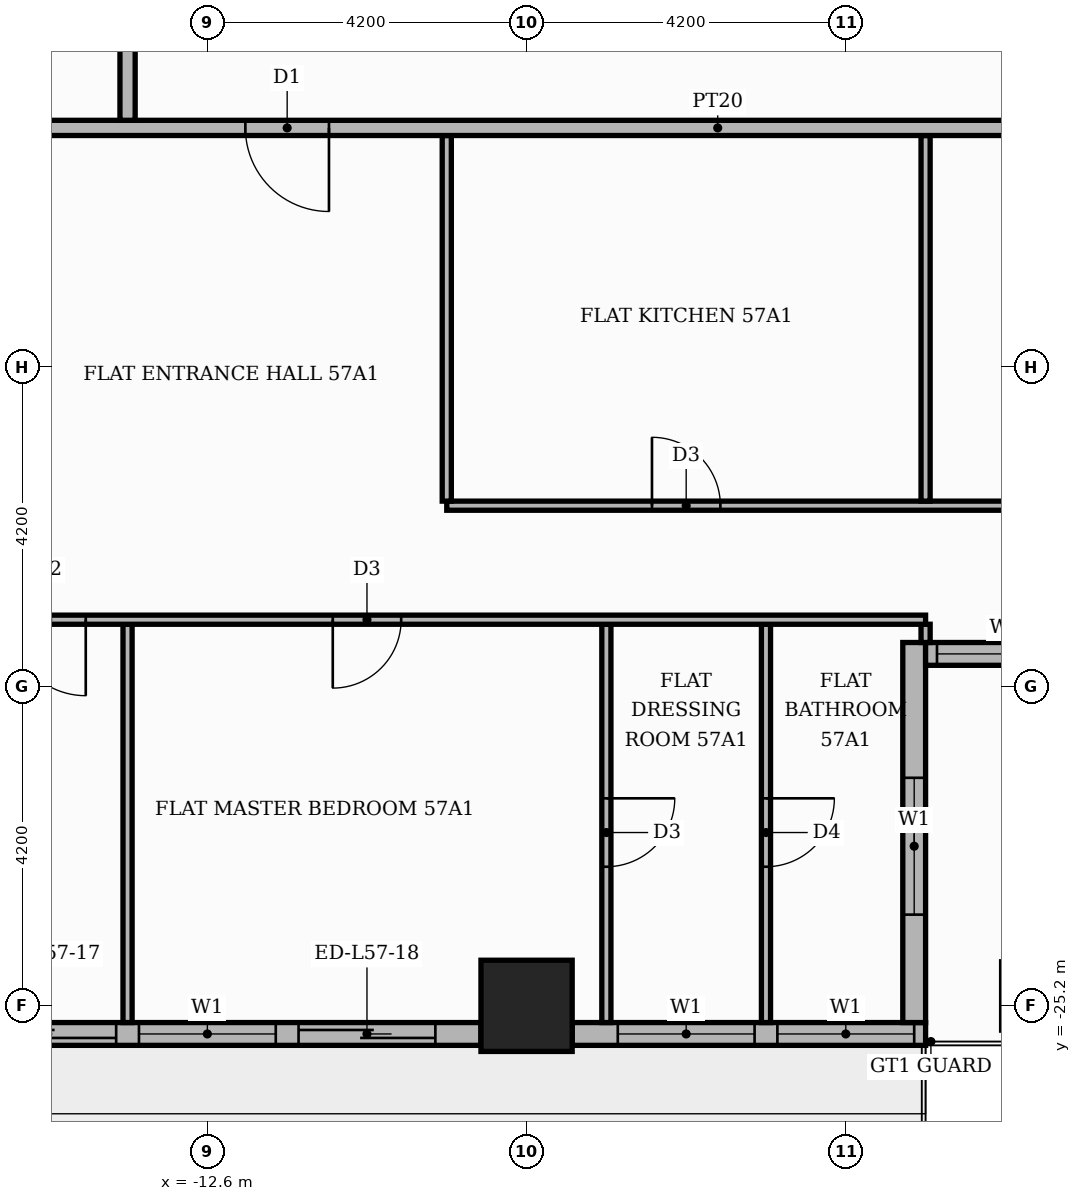
"""IFC4 building model, lengths in metres.
Left out: names, types, materials, properties, quantities, classifications, styles, units other than length and angle.
Written with IfcOpenShell. Run it as: python <this file> out.ifc"""

import sys

from ifc_helpers import new_model, si_unit, direction, frame, frame_2d, origin, origin_2d, place, context, subcontext, project, spatial, rectangle, extrude, element, fill, save


model = new_model("IFC4")
c1 = context("Model", 3, precision=1e-05, world=origin(), true_north=direction((0.0, 1.0)))
c2 = subcontext(c1, "Body", "Model", "MODEL_VIEW")
j1 = project(units=[si_unit("LENGTHUNIT", "METRE"), si_unit("PLANEANGLEUNIT", "RADIAN")], contexts=[c1])
p1 = place(None, origin())
s1 = spatial("IfcSite", under=j1, at=p1, CompositionType="ELEMENT")
p2 = place(p1, origin())
s2 = spatial("IfcBuilding", under=s1, at=p2, CompositionType="ELEMENT")
p3 = place(p2, frame((0.0, 0.0, 240.6)))
s3 = spatial("IfcBuildingStorey", under=s2, at=p3, CompositionType="ELEMENT", Elevation=240.6)
p4 = place(p3, frame((-8.4, -25.2, 0.0), z_axis=(0.0, 0.0, 1.0), x_axis=(1.0, 0.0, 0.0)))
e1 = element("IfcColumn", 1, at=p4, inside=s3, PredefinedType="COLUMN", context=c2, shape_type="SweptSolid", body=[
    extrude(rectangle(XDim=1.2, YDim=1.2, at=origin_2d()), origin(), (0.0, 0.0, 1.0), 3.9),
])
p5 = place(p3, frame((-16.2, -25.57, 0.0), z_axis=(0.0, 0.0, 1.0), x_axis=(1.0, 0.0, 0.0)))
e2 = element("IfcWall", 2, at=p5, inside=s3, PredefinedType="STANDARD", context=c2, shape_type="SweptSolid", body=[
    extrude(rectangle(XDim=7.2, YDim=0.3, at=frame_2d((3.6, 0.0))), origin(), (0.0, 0.0, 1.0), 3.48),
])
p6 = place(p5, frame((0.6, 0.0, 0.0)))
e3 = element("IfcOpeningElement", 3, at=p6, cuts=e2, PredefinedType="OPENING", context=c2, shape_type="SweptSolid", body=[
    extrude(rectangle(XDim=1.8, YDim=2.4, at=frame_2d((0.9, 1.2))), frame((0.0, 0.16, 0.0), z_axis=(0.0, -1.0, 0.0), x_axis=(1.0, 0.0, 0.0)), (0.0, 0.0, 1.0), 0.32),
])
p7 = place(p5, frame((2.7, 0.0, 0.9)))
e4 = element("IfcOpeningElement", 4, at=p7, cuts=e2, PredefinedType="OPENING", context=c2, shape_type="SweptSolid", body=[
    extrude(rectangle(XDim=1.8, YDim=2.1, at=frame_2d((0.9, 1.05))), frame((0.0, 0.16, 0.0), z_axis=(0.0, -1.0, 0.0), x_axis=(1.0, 0.0, 0.0)), (0.0, 0.0, 1.0), 0.32),
])
p8 = place(p5, frame((4.8, 0.0, 0.0)))
e5 = element("IfcOpeningElement", 5, at=p8, cuts=e2, PredefinedType="OPENING", context=c2, shape_type="SweptSolid", body=[
    extrude(rectangle(XDim=1.8, YDim=2.4, at=frame_2d((0.9, 1.2))), frame((0.0, 0.16, 0.0), z_axis=(0.0, -1.0, 0.0), x_axis=(1.0, 0.0, 0.0)), (0.0, 0.0, 1.0), 0.32),
])
p9 = place(p3, frame((-7.8, -25.57, 0.0), z_axis=(0.0, 0.0, 1.0), x_axis=(1.0, 0.0, 0.0)))
e6 = element("IfcWall", 6, at=p9, inside=s3, PredefinedType="STANDARD", context=c2, shape_type="SweptSolid", body=[
    extrude(rectangle(XDim=4.65, YDim=0.3, at=frame_2d((2.325, 0.0))), origin(), (0.0, 0.0, 1.0), 3.48),
])
p10 = place(p9, frame((0.6, 0.0, 0.9)))
e7 = element("IfcOpeningElement", 7, at=p10, cuts=e6, PredefinedType="OPENING", context=c2, shape_type="SweptSolid", body=[
    extrude(rectangle(XDim=1.8, YDim=2.1, at=frame_2d((0.9, 1.05))), frame((0.0, 0.16, 0.0), z_axis=(0.0, -1.0, 0.0), x_axis=(1.0, 0.0, 0.0)), (0.0, 0.0, 1.0), 0.32),
])
p11 = place(p9, frame((2.7, 0.0, 0.9)))
e8 = element("IfcOpeningElement", 8, at=p11, cuts=e6, PredefinedType="OPENING", context=c2, shape_type="SweptSolid", body=[
    extrude(rectangle(XDim=1.8, YDim=2.1, at=frame_2d((0.9, 1.05))), frame((0.0, 0.16, 0.0), z_axis=(0.0, -1.0, 0.0), x_axis=(1.0, 0.0, 0.0)), (0.0, 0.0, 1.0), 0.32),
])
p12 = place(p3, frame((-3.3, -25.42, 0.0), z_axis=(0.0, 0.0, 1.0), x_axis=(0.0, 1.0, 0.0)))
e9 = element("IfcWall", 9, at=p12, inside=s3, PredefinedType="STANDARD", context=c2, shape_type="SweptSolid", body=[
    extrude(rectangle(XDim=5.0, YDim=0.3, at=frame_2d((2.5, 0.0))), origin(), (0.0, 0.0, 1.0), 3.48),
])
p13 = place(p12, frame((1.42, 0.0, 0.9)))
e10 = element("IfcOpeningElement", 10, at=p13, cuts=e9, PredefinedType="OPENING", context=c2, shape_type="SweptSolid", body=[
    extrude(rectangle(XDim=1.8, YDim=2.1, at=frame_2d((0.9, 1.05))), frame((0.0, 0.16, 0.0), z_axis=(0.0, -1.0, 0.0), x_axis=(1.0, 0.0, 0.0)), (0.0, 0.0, 1.0), 0.32),
])
p14 = place(p3, frame((-3.15, -20.57, 0.0), z_axis=(0.0, 0.0, 1.0), x_axis=(1.0, 0.0, 0.0)))
e11 = element("IfcWall", 11, at=p14, inside=s3, PredefinedType="STANDARD", context=c2, shape_type="SweptSolid", body=[
    extrude(rectangle(XDim=6.6, YDim=0.3, at=frame_2d((3.3, 0.0))), origin(), (0.0, 0.0, 1.0), 3.48),
])
p15 = place(p14, frame((0.15, 0.0, 0.9)))
e12 = element("IfcOpeningElement", 12, at=p15, cuts=e11, PredefinedType="OPENING", context=c2, shape_type="SweptSolid", body=[
    extrude(rectangle(XDim=1.8, YDim=2.1, at=frame_2d((0.9, 1.05))), frame((0.0, 0.16, 0.0), z_axis=(0.0, -1.0, 0.0), x_axis=(1.0, 0.0, 0.0)), (0.0, 0.0, 1.0), 0.32),
])
p16 = place(p14, frame((2.25, 0.0, 0.0)))
e13 = element("IfcOpeningElement", 13, at=p16, cuts=e11, PredefinedType="OPENING", context=c2, shape_type="SweptSolid", body=[
    extrude(rectangle(XDim=1.8, YDim=2.4, at=frame_2d((0.9, 1.2))), frame((0.0, 0.16, 0.0), z_axis=(0.0, -1.0, 0.0), x_axis=(1.0, 0.0, 0.0)), (0.0, 0.0, 1.0), 0.32),
])
p17 = place(p14, frame((4.35, 0.0, 0.9)))
e14 = element("IfcOpeningElement", 14, at=p17, cuts=e11, PredefinedType="OPENING", context=c2, shape_type="SweptSolid", body=[
    extrude(rectangle(XDim=1.8, YDim=2.1, at=frame_2d((0.9, 1.05))), frame((0.0, 0.16, 0.0), z_axis=(0.0, -1.0, 0.0), x_axis=(1.0, 0.0, 0.0)), (0.0, 0.0, 1.0), 0.32),
])
p18 = place(p3, frame((-13.65, -25.42, 0.0), z_axis=(0.0, 0.0, 1.0), x_axis=(0.0, 1.0, 0.0)))
e15 = element("IfcWall", 15, at=p18, inside=s3, PredefinedType="PARTITIONING", context=c2, shape_type="SweptSolid", body=[
    extrude(rectangle(XDim=5.24, YDim=0.12, at=frame_2d((2.62, 0.0))), origin(), (0.0, 0.0, 1.0), 3.48),
])
p19 = place(p3, frame((-7.35, -25.42, 0.0), z_axis=(0.0, 0.0, 1.0), x_axis=(0.0, 1.0, 0.0)))
e16 = element("IfcWall", 16, at=p19, inside=s3, PredefinedType="PARTITIONING", context=c2, shape_type="SweptSolid", body=[
    extrude(rectangle(XDim=5.24, YDim=0.12, at=frame_2d((2.62, 0.0))), origin(), (0.0, 0.0, 1.0), 3.48),
])
p20 = place(p19, frame((2.05, 0.0, 0.0)))
e17 = element("IfcOpeningElement", 17, at=p20, cuts=e16, PredefinedType="OPENING", context=c2, shape_type="SweptSolid", body=[
    extrude(rectangle(XDim=0.9, YDim=2.1, at=frame_2d((0.45, 1.05))), frame((0.0, 0.07, 0.0), z_axis=(0.0, -1.0, 0.0), x_axis=(1.0, 0.0, 0.0)), (0.0, 0.0, 1.0), 0.14),
])
p21 = place(p3, frame((-5.25, -25.42, 0.0), z_axis=(0.0, 0.0, 1.0), x_axis=(0.0, 1.0, 0.0)))
e18 = element("IfcWall", 18, at=p21, inside=s3, PredefinedType="PARTITIONING", context=c2, shape_type="SweptSolid", body=[
    extrude(rectangle(XDim=5.24, YDim=0.12, at=frame_2d((2.62, 0.0))), origin(), (0.0, 0.0, 1.0), 3.48),
])
p22 = place(p21, frame((2.05, 0.0, 0.0)))
e19 = element("IfcOpeningElement", 19, at=p22, cuts=e18, PredefinedType="OPENING", context=c2, shape_type="SweptSolid", body=[
    extrude(rectangle(XDim=0.9, YDim=2.1, at=frame_2d((0.45, 1.05))), frame((0.0, 0.07, 0.0), z_axis=(0.0, -1.0, 0.0), x_axis=(1.0, 0.0, 0.0)), (0.0, 0.0, 1.0), 0.14),
])
p23 = place(p3, frame((-3.15, -20.42, 0.0), z_axis=(0.0, 0.0, 1.0), x_axis=(0.0, 1.0, 0.0)))
e20 = element("IfcWall", 20, at=p23, inside=s3, PredefinedType="PARTITIONING", context=c2, shape_type="SweptSolid", body=[
    extrude(rectangle(XDim=0.24, YDim=0.12, at=frame_2d((0.12, 0.0))), origin(), (0.0, 0.0, 1.0), 3.48),
])
p24 = place(p3, frame((-20.719, -20.12, 0.0), z_axis=(0.0, 0.0, 1.0), x_axis=(1.0, 0.0, 0.0)))
e21 = element("IfcWall", 21, at=p24, inside=s3, PredefinedType="PARTITIONING", context=c2, shape_type="SweptSolid", body=[
    extrude(rectangle(XDim=17.569, YDim=0.12, at=frame_2d((8.785, 0.0))), origin(), (0.0, 0.0, 1.0), 3.48),
])
p25 = place(p24, frame((5.519, 0.0, 0.0)))
e22 = element("IfcOpeningElement", 22, at=p25, cuts=e21, PredefinedType="OPENING", context=c2, shape_type="SweptSolid", body=[
    extrude(rectangle(XDim=1.0, YDim=2.1, at=frame_2d((0.5, 1.05))), frame((0.0, 0.07, 0.0), z_axis=(0.0, -1.0, 0.0), x_axis=(1.0, 0.0, 0.0)), (0.0, 0.0, 1.0), 0.14),
])
p26 = place(p24, frame((9.769, 0.0, 0.0)))
e23 = element("IfcOpeningElement", 23, at=p26, cuts=e21, PredefinedType="OPENING", context=c2, shape_type="SweptSolid", body=[
    extrude(rectangle(XDim=0.9, YDim=2.1, at=frame_2d((0.45, 1.05))), frame((0.0, 0.07, 0.0), z_axis=(0.0, -1.0, 0.0), x_axis=(1.0, 0.0, 0.0)), (0.0, 0.0, 1.0), 0.14),
])
p27 = place(p3, frame((-9.45, -18.62, 0.0), z_axis=(0.0, 0.0, 1.0), x_axis=(1.0, 0.0, 0.0)))
e24 = element("IfcWall", 24, at=p27, inside=s3, PredefinedType="PARTITIONING", context=c2, shape_type="SweptSolid", body=[
    extrude(rectangle(XDim=23.0, YDim=0.12, at=frame_2d((11.5, 0.0))), origin(), (0.0, 0.0, 1.0), 3.48),
])
p28 = place(p27, frame((2.7, 0.0, 0.0)))
e25 = element("IfcOpeningElement", 25, at=p28, cuts=e24, PredefinedType="OPENING", context=c2, shape_type="SweptSolid", body=[
    extrude(rectangle(XDim=0.9, YDim=2.1, at=frame_2d((0.45, 1.05))), frame((0.0, 0.07, 0.0), z_axis=(0.0, -1.0, 0.0), x_axis=(1.0, 0.0, 0.0)), (0.0, 0.0, 1.0), 0.14),
])
p29 = place(p27, frame((9.0, 0.0, 0.0)))
e26 = element("IfcOpeningElement", 26, at=p29, cuts=e24, PredefinedType="OPENING", context=c2, shape_type="SweptSolid", body=[
    extrude(rectangle(XDim=0.9, YDim=2.1, at=frame_2d((0.45, 1.05))), frame((0.0, 0.07, 0.0), z_axis=(0.0, -1.0, 0.0), x_axis=(1.0, 0.0, 0.0)), (0.0, 0.0, 1.0), 0.14),
])
p30 = place(p27, frame((13.2, 0.0, 0.0)))
e27 = element("IfcOpeningElement", 27, at=p30, cuts=e24, PredefinedType="OPENING", context=c2, shape_type="SweptSolid", body=[
    extrude(rectangle(XDim=0.9, YDim=2.1, at=frame_2d((0.45, 1.05))), frame((0.0, 0.07, 0.0), z_axis=(0.0, -1.0, 0.0), x_axis=(1.0, 0.0, 0.0)), (0.0, 0.0, 1.0), 0.14),
])
p31 = place(p27, frame((16.35, 0.0, 0.0)))
e28 = element("IfcOpeningElement", 28, at=p31, cuts=e24, PredefinedType="OPENING", context=c2, shape_type="SweptSolid", body=[
    extrude(rectangle(XDim=0.9, YDim=2.1, at=frame_2d((0.45, 1.05))), frame((0.0, 0.07, 0.0), z_axis=(0.0, -1.0, 0.0), x_axis=(1.0, 0.0, 0.0)), (0.0, 0.0, 1.0), 0.14),
])
p32 = place(p27, frame((20.55, 0.0, 0.0)))
e29 = element("IfcOpeningElement", 29, at=p32, cuts=e24, PredefinedType="OPENING", context=c2, shape_type="SweptSolid", body=[
    extrude(rectangle(XDim=0.9, YDim=2.1, at=frame_2d((0.45, 1.05))), frame((0.0, 0.07, 0.0), z_axis=(0.0, -1.0, 0.0), x_axis=(1.0, 0.0, 0.0)), (0.0, 0.0, 1.0), 0.14),
])
for number, where, z_axis, x_axis in (
    (30, (-9.45, -18.56, 0.0), (0.0, 0.0, 1.0), (0.0, 1.0, 0.0)),
    (31, (-3.15, -18.56, 0.0), (0.0, 0.0, 1.0), (0.0, 1.0, 0.0)),
):
    element("IfcWall", number, at=place(p3, frame(where, z_axis=z_axis, x_axis=x_axis)), inside=s3, PredefinedType="PARTITIONING", context=c2, shape_type="SweptSolid", body=[
        extrude(rectangle(XDim=4.81, YDim=0.12, at=frame_2d((2.405, 0.0))), origin(), (0.0, 0.0, 1.0), 3.48),
    ])
p33 = place(p3, frame((-25.42, -13.65, 0.0), z_axis=(0.0, 0.0, 1.0), x_axis=(1.0, 0.0, 0.0)))
e32 = element("IfcWall", 32, at=p33, inside=s3, PredefinedType="PARTITIONING", context=c2, shape_type="SweptSolid", body=[
    extrude(rectangle(XDim=39.07, YDim=0.2, at=frame_2d((19.535, 0.0))), origin(), (0.0, 0.0, 1.0), 3.48),
])
p34 = place(p33, frame((13.32, 0.0, 0.0)))
e33 = element("IfcOpeningElement", 33, at=p34, cuts=e32, PredefinedType="OPENING", context=c2, shape_type="SweptSolid", body=[
    extrude(rectangle(XDim=1.1, YDim=2.4, at=frame_2d((0.55, 1.2))), frame((0.0, 0.11, 0.0), z_axis=(0.0, -1.0, 0.0), x_axis=(1.0, 0.0, 0.0)), (0.0, 0.0, 1.0), 0.22),
])
p35 = place(p3, frame((-13.65, -13.55, 0.0), z_axis=(0.0, 0.0, 1.0), x_axis=(0.0, 1.0, 0.0)))
e34 = element("IfcWall", 34, at=p35, inside=s3, PredefinedType="PARTITIONING", context=c2, shape_type="SweptSolid", body=[
    extrude(rectangle(XDim=2.45, YDim=0.2, at=frame_2d((1.225, 0.0))), origin(), (0.0, 0.0, 1.0), 3.48),
])
p36 = place(p6, origin())
e35 = element("IfcDoor", 35, at=p36, inside=s3, OperationType="SLIDING_TO_LEFT", PredefinedType="DOOR", context=c2, shape_type="SweptSolid", body=[
    extrude(rectangle(XDim=1.8, YDim=2.4, at=frame_2d((0.9, 1.2))), frame((0.0, 0.025, 0.0), z_axis=(0.0, -1.0, 0.0), x_axis=(1.0, 0.0, 0.0)), (0.0, 0.0, 1.0), 0.05),
])
fill(e3, e35)
p37 = place(p7, origin())
e36 = element("IfcWindow", 36, at=p37, inside=s3, PartitioningType="SINGLE_PANEL", PredefinedType="WINDOW", context=c2, shape_type="SweptSolid", body=[
    extrude(rectangle(XDim=1.8, YDim=2.1, at=frame_2d((0.9, 1.05))), frame((0.0, 0.03, 0.0), z_axis=(0.0, -1.0, 0.0), x_axis=(1.0, 0.0, 0.0)), (0.0, 0.0, 1.0), 0.06),
])
fill(e4, e36)
p38 = place(p8, origin())
e37 = element("IfcDoor", 37, at=p38, inside=s3, OperationType="SLIDING_TO_RIGHT", PredefinedType="DOOR", context=c2, shape_type="SweptSolid", body=[
    extrude(rectangle(XDim=1.8, YDim=2.4, at=frame_2d((0.9, 1.2))), frame((0.0, 0.025, 0.0), z_axis=(0.0, -1.0, 0.0), x_axis=(1.0, 0.0, 0.0)), (0.0, 0.0, 1.0), 0.05),
])
fill(e5, e37)
p39 = place(p10, origin())
e38 = element("IfcWindow", 38, at=p39, inside=s3, PartitioningType="SINGLE_PANEL", PredefinedType="WINDOW", context=c2, shape_type="SweptSolid", body=[
    extrude(rectangle(XDim=1.8, YDim=2.1, at=frame_2d((0.9, 1.05))), frame((0.0, 0.03, 0.0), z_axis=(0.0, -1.0, 0.0), x_axis=(1.0, 0.0, 0.0)), (0.0, 0.0, 1.0), 0.06),
])
fill(e7, e38)
p40 = place(p11, origin())
e39 = element("IfcWindow", 39, at=p40, inside=s3, PartitioningType="SINGLE_PANEL", PredefinedType="WINDOW", context=c2, shape_type="SweptSolid", body=[
    extrude(rectangle(XDim=1.8, YDim=2.1, at=frame_2d((0.9, 1.05))), frame((0.0, 0.03, 0.0), z_axis=(0.0, -1.0, 0.0), x_axis=(1.0, 0.0, 0.0)), (0.0, 0.0, 1.0), 0.06),
])
fill(e8, e39)
p41 = place(p13, origin())
e40 = element("IfcWindow", 40, at=p41, inside=s3, PartitioningType="SINGLE_PANEL", PredefinedType="WINDOW", context=c2, shape_type="SweptSolid", body=[
    extrude(rectangle(XDim=1.8, YDim=2.1, at=frame_2d((0.9, 1.05))), frame((0.0, 0.03, 0.0), z_axis=(0.0, -1.0, 0.0), x_axis=(1.0, 0.0, 0.0)), (0.0, 0.0, 1.0), 0.06),
])
fill(e10, e40)
p42 = place(p15, origin())
e41 = element("IfcWindow", 41, at=p42, inside=s3, PartitioningType="SINGLE_PANEL", PredefinedType="WINDOW", context=c2, shape_type="SweptSolid", body=[
    extrude(rectangle(XDim=1.8, YDim=2.1, at=frame_2d((0.9, 1.05))), frame((0.0, 0.03, 0.0), z_axis=(0.0, -1.0, 0.0), x_axis=(1.0, 0.0, 0.0)), (0.0, 0.0, 1.0), 0.06),
])
fill(e12, e41)
p43 = place(p34, frame((1.1, 0.0, 0.0), z_axis=(0.0, 0.0, 1.0), x_axis=(-1.0, 0.0, 0.0)))
e42 = element("IfcDoor", 42, at=p43, inside=s3, OperationType="SINGLE_SWING_RIGHT", PredefinedType="DOOR", context=c2, shape_type="SweptSolid", body=[
    extrude(rectangle(XDim=1.1, YDim=2.4, at=frame_2d((0.55, 1.2))), frame((0.0, 0.025, 0.0), z_axis=(0.0, -1.0, 0.0), x_axis=(1.0, 0.0, 0.0)), (0.0, 0.0, 1.0), 0.05),
])
fill(e33, e42)
p44 = place(p28, origin())
e43 = element("IfcDoor", 43, at=p44, inside=s3, OperationType="SINGLE_SWING_LEFT", PredefinedType="DOOR", context=c2, shape_type="SweptSolid", body=[
    extrude(rectangle(XDim=0.9, YDim=2.1, at=frame_2d((0.45, 1.05))), frame((0.0, 0.025, 0.0), z_axis=(0.0, -1.0, 0.0), x_axis=(1.0, 0.0, 0.0)), (0.0, 0.0, 1.0), 0.05),
])
fill(e25, e43)
p45 = place(p25, frame((1.0, 0.0, 0.0), z_axis=(0.0, 0.0, 1.0), x_axis=(-1.0, 0.0, 0.0)))
e44 = element("IfcDoor", 44, at=p45, inside=s3, OperationType="SINGLE_SWING_RIGHT", PredefinedType="DOOR", context=c2, shape_type="SweptSolid", body=[
    extrude(rectangle(XDim=1.0, YDim=2.1, at=frame_2d((0.5, 1.05))), frame((0.0, 0.025, 0.0), z_axis=(0.0, -1.0, 0.0), x_axis=(1.0, 0.0, 0.0)), (0.0, 0.0, 1.0), 0.05),
])
fill(e22, e44)
p46 = place(p26, frame((0.9, 0.0, 0.0), z_axis=(0.0, 0.0, 1.0), x_axis=(-1.0, 0.0, 0.0)))
e45 = element("IfcDoor", 45, at=p46, inside=s3, OperationType="SINGLE_SWING_LEFT", PredefinedType="DOOR", context=c2, shape_type="SweptSolid", body=[
    extrude(rectangle(XDim=0.9, YDim=2.1, at=frame_2d((0.45, 1.05))), frame((0.0, 0.025, 0.0), z_axis=(0.0, -1.0, 0.0), x_axis=(1.0, 0.0, 0.0)), (0.0, 0.0, 1.0), 0.05),
])
fill(e23, e45)
p47 = place(p20, frame((0.9, 0.0, 0.0), z_axis=(0.0, 0.0, 1.0), x_axis=(-1.0, 0.0, 0.0)))
e46 = element("IfcDoor", 46, at=p47, inside=s3, OperationType="SINGLE_SWING_RIGHT", PredefinedType="DOOR", context=c2, shape_type="SweptSolid", body=[
    extrude(rectangle(XDim=0.9, YDim=2.1, at=frame_2d((0.45, 1.05))), frame((0.0, 0.025, 0.0), z_axis=(0.0, -1.0, 0.0), x_axis=(1.0, 0.0, 0.0)), (0.0, 0.0, 1.0), 0.05),
])
fill(e17, e46)
p48 = place(p22, frame((0.9, 0.0, 0.0), z_axis=(0.0, 0.0, 1.0), x_axis=(-1.0, 0.0, 0.0)))
e47 = element("IfcDoor", 47, at=p48, inside=s3, OperationType="SINGLE_SWING_RIGHT", PredefinedType="DOOR", context=c2, shape_type="SweptSolid", body=[
    extrude(rectangle(XDim=0.9, YDim=2.1, at=frame_2d((0.45, 1.05))), frame((0.0, 0.025, 0.0), z_axis=(0.0, -1.0, 0.0), x_axis=(1.0, 0.0, 0.0)), (0.0, 0.0, 1.0), 0.05),
])
fill(e19, e47)
save(model, sys.argv[1])
